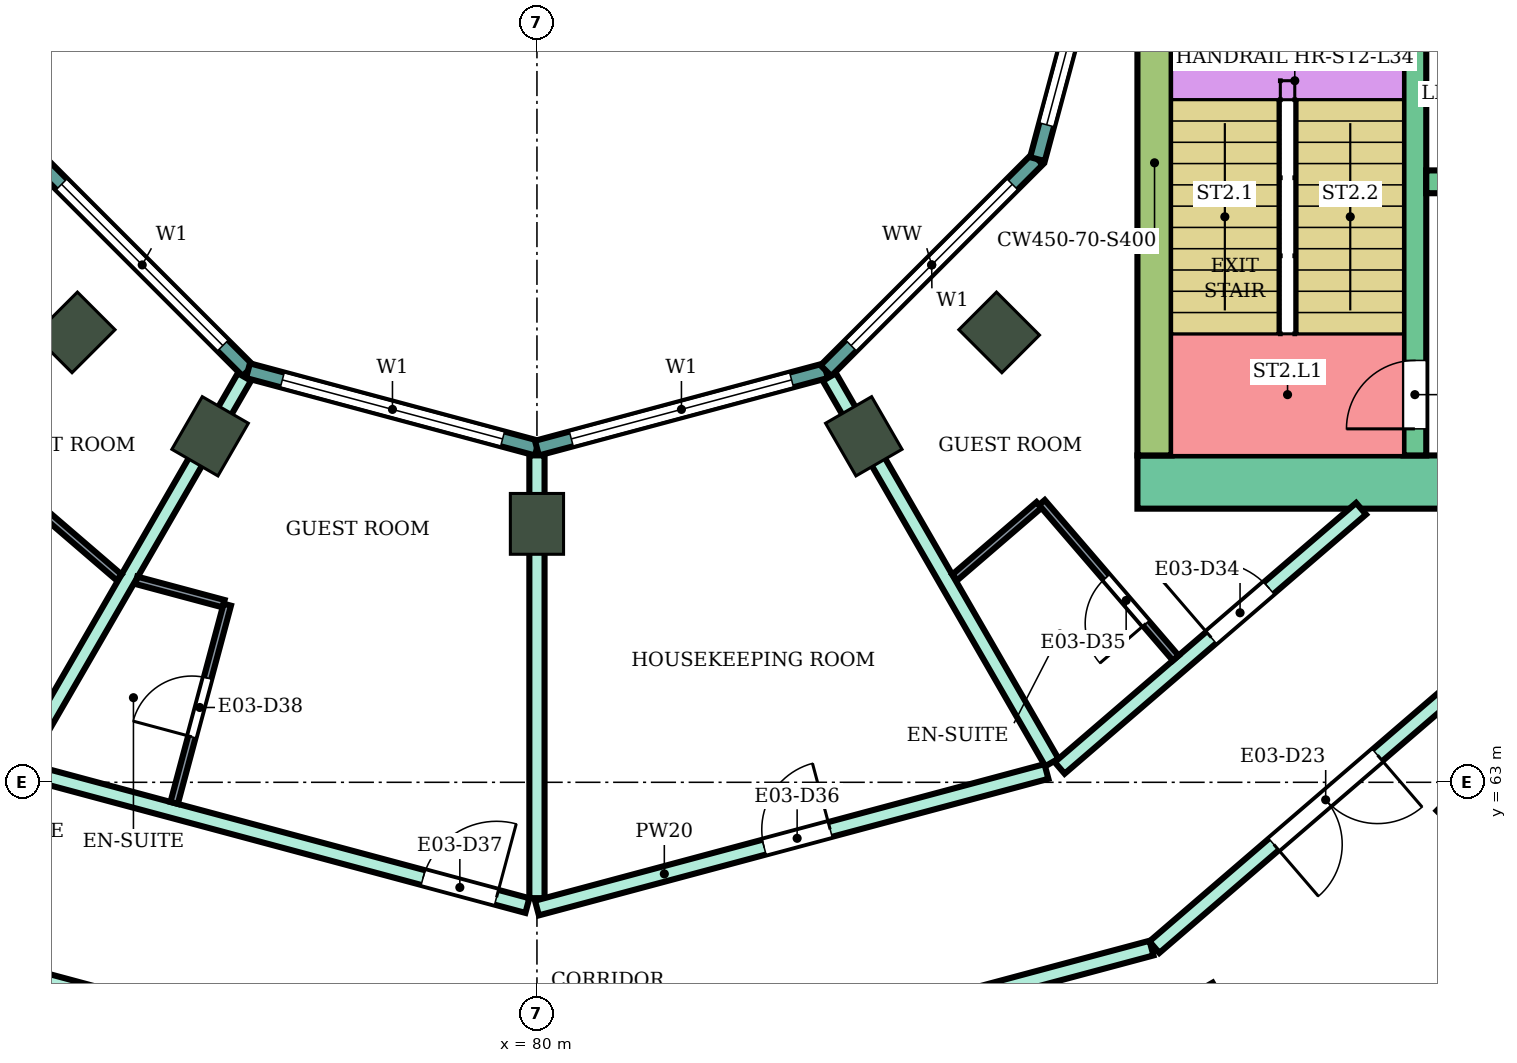
"""IFC4 building model, lengths in metres.
Left out: names, types, materials, properties, quantities, classifications, styles, units other than length and angle.
Written with IfcOpenShell. Run it as: python <this file> out.ifc"""

import sys

from ifc_helpers import new_model, si_unit, direction, frame, frame_2d, origin, origin_2d, place, context, subcontext, project, spatial, rectangle, extrude, element, fill, save


model = new_model("IFC4")
c1 = context("Model", 3, precision=1e-05, world=origin(), true_north=direction((0.0, 1.0)))
c2 = subcontext(c1, "Body", "Model", "MODEL_VIEW")
j1 = project(units=[si_unit("LENGTHUNIT", "METRE"), si_unit("PLANEANGLEUNIT", "RADIAN")], contexts=[c1])
p1 = place(None, origin())
s1 = spatial("IfcSite", under=j1, at=p1, CompositionType="ELEMENT")
p2 = place(p1, origin())
s2 = spatial("IfcBuilding", under=s1, at=p2, CompositionType="ELEMENT")
p3 = place(p2, frame((0.0, 0.0, 145.8)))
s3 = spatial("IfcBuildingStorey", under=s2, at=p3, CompositionType="ELEMENT", Elevation=145.8)
for number, where, z_axis, x_axis in (
    (1, (88.8, 59.758, 0.0), (0.0, 0.0, 1.0), (0.5, -0.866, 0.0)),
    (2, (92.445, 62.555, 0.0), (0.0, 0.0, 1.0), (0.707, -0.707, 0.0)),
):
    element("IfcColumn", number, at=place(p3, frame(where, z_axis=z_axis, x_axis=x_axis)), inside=s3, PredefinedType="COLUMN", context=c2, shape_type="SweptSolid", body=[
        extrude(rectangle(XDim=1.0, YDim=0.8, at=origin_2d()), origin(), (0.0, 0.0, 1.0), 3.9),
    ])
for number, where, z_axis, x_axis in (
    (3, (73.919, 68.919, 0.0), (0.0, 0.0, 1.0), (-0.707, -0.707, 0.0)),
    (4, (75.7, 67.552, 0.0), (0.0, 0.0, 1.0), (-0.5, -0.866, 0.0)),
    (5, (80.0, 66.4, 0.0), (0.0, 0.0, 1.0), (0.0, -1.0, 0.0)),
    (6, (84.3, 67.552, 0.0), (0.0, 0.0, 1.0), (0.5, -0.866, 0.0)),
    (7, (86.081, 68.919, 0.0), (0.0, 0.0, 1.0), (0.707, -0.707, 0.0)),
):
    element("IfcColumn", number, at=place(p3, frame(where, z_axis=z_axis, x_axis=x_axis)), inside=s3, PredefinedType="COLUMN", context=c2, shape_type="SweptSolid", body=[
        extrude(rectangle(XDim=0.8, YDim=0.7, at=origin_2d()), origin(), (0.0, 0.0, 1.0), 3.9),
    ])
p4 = place(p3, frame((87.9, 66.95, 0.0), z_axis=(0.0, 0.0, 1.0), x_axis=(1.0, 0.0, 0.0)))
e8 = element("IfcWall", 8, at=p4, inside=s3, PredefinedType="SHEAR", context=c2, shape_type="SweptSolid", body=[
    extrude(rectangle(XDim=14.8, YDim=0.7, at=frame_2d((7.4, 0.0))), origin(), (0.0, 0.0, 1.0), 3.5),
])
p5 = place(p4, frame((4.2, 0.0, 0.0)))
e9 = element("IfcOpeningElement", 9, at=p5, cuts=e8, PredefinedType="OPENING", context=c2, shape_type="SweptSolid", body=[
    extrude(rectangle(XDim=2.4, YDim=2.4, at=frame_2d((1.2, 1.2))), frame((0.0, 0.36, 0.0), z_axis=(0.0, -1.0, 0.0), x_axis=(1.0, 0.0, 0.0)), (0.0, 0.0, 1.0), 0.72),
])
p6 = place(p3, frame((88.125, 67.3, 0.0), z_axis=(0.0, 0.0, 1.0), x_axis=(0.0, 1.0, 0.0)))
e10 = element("IfcWall", 10, at=p6, inside=s3, PredefinedType="SHEAR", context=c2, shape_type="SweptSolid", body=[
    extrude(rectangle(XDim=7.7, YDim=0.45, at=frame_2d((3.85, 0.0))), origin(), (0.0, 0.0, 1.0), 3.5),
])
p7 = place(p3, frame((91.55, 67.3, 0.0), z_axis=(0.0, 0.0, 1.0), x_axis=(0.0, 1.0, 0.0)))
e11 = element("IfcWall", 11, at=p7, inside=s3, PredefinedType="SHEAR", context=c2, shape_type="SweptSolid", body=[
    extrude(rectangle(XDim=7.7, YDim=0.3, at=frame_2d((3.85, 0.0))), origin(), (0.0, 0.0, 1.0), 3.5),
])
p8 = place(p7, frame((0.35, 0.0, 0.0)))
e12 = element("IfcOpeningElement", 12, at=p8, cuts=e11, PredefinedType="OPENING", context=c2, shape_type="SweptSolid", body=[
    extrude(rectangle(XDim=0.9, YDim=2.1, at=frame_2d((0.45, 1.05))), frame((0.0, 0.16, 0.0), z_axis=(0.0, -1.0, 0.0), x_axis=(1.0, 0.0, 0.0)), (0.0, 0.0, 1.0), 0.32),
])
p9 = place(p3, frame((91.7, 70.9, 0.0), z_axis=(0.0, 0.0, 1.0), x_axis=(1.0, 0.0, 0.0)))
e13 = element("IfcWall", 13, at=p9, inside=s3, PredefinedType="SHEAR", context=c2, shape_type="SweptSolid", body=[
    extrude(rectangle(XDim=11.0, YDim=0.3, at=frame_2d((5.5, 0.0))), origin(), (0.0, 0.0, 1.0), 3.5),
])
p10 = place(p9, frame((0.4, 0.0, 0.0)))
e14 = element("IfcOpeningElement", 14, at=p10, cuts=e13, PredefinedType="OPENING", context=c2, shape_type="SweptSolid", body=[
    extrude(rectangle(XDim=1.4, YDim=2.1, at=frame_2d((0.7, 1.05))), frame((0.0, 0.16, 0.0), z_axis=(0.0, -1.0, 0.0), x_axis=(1.0, 0.0, 0.0)), (0.0, 0.0, 1.0), 0.32),
])
p11 = place(p9, frame((5.4, 0.0, 0.0)))
e15 = element("IfcOpeningElement", 15, at=p11, cuts=e13, PredefinedType="OPENING", context=c2, shape_type="SweptSolid", body=[
    extrude(rectangle(XDim=1.4, YDim=2.1, at=frame_2d((0.7, 1.05))), frame((0.0, 0.16, 0.0), z_axis=(0.0, -1.0, 0.0), x_axis=(1.0, 0.0, 0.0)), (0.0, 0.0, 1.0), 0.32),
])
p12 = place(p9, frame((8.1, 0.0, 0.0)))
e16 = element("IfcOpeningElement", 16, at=p12, cuts=e13, PredefinedType="OPENING", context=c2, shape_type="SweptSolid", body=[
    extrude(rectangle(XDim=1.0, YDim=2.1, at=frame_2d((0.5, 1.05))), frame((0.0, 0.16, 0.0), z_axis=(0.0, -1.0, 0.0), x_axis=(1.0, 0.0, 0.0)), (0.0, 0.0, 1.0), 0.32),
])
p13 = place(p3, frame((73.415, 71.198, 0.0), z_axis=(0.0, 0.0, 1.0), x_axis=(0.707106781187, -0.707106781187, 0.0)))
e17 = element("IfcWall", 17, at=p13, inside=s3, PredefinedType="NOTDEFINED", context=c2, shape_type="SweptSolid", body=[
    extrude(rectangle(XDim=3.936, YDim=0.2, at=frame_2d((1.968, 0.0))), origin(), (0.0, 0.0, 1.0), 3.9),
])
p14 = place(p13, frame((0.468, 0.0, 0.9)))
e18 = element("IfcOpeningElement", 18, at=p14, cuts=e17, PredefinedType="OPENING", context=c2, shape_type="SweptSolid", body=[
    extrude(rectangle(XDim=3.0, YDim=2.3, at=frame_2d((1.5, 1.15))), frame((0.0, 0.11, 0.0), z_axis=(0.0, -1.0, 0.0), x_axis=(1.0, 0.0, 0.0)), (0.0, 0.0, 1.0), 0.22),
])
p15 = place(p3, frame((76.198, 68.415, 0.0), z_axis=(0.0, 0.0, 1.0), x_axis=(0.965933654434, -0.258789828301, 0.0)))
e19 = element("IfcWall", 19, at=p15, inside=s3, PredefinedType="NOTDEFINED", context=c2, shape_type="SweptSolid", body=[
    extrude(rectangle(XDim=3.936, YDim=0.2, at=frame_2d((1.968, 0.0))), origin(), (0.0, 0.0, 1.0), 3.9),
])
p16 = place(p15, frame((0.468, 0.0, 0.9)))
e20 = element("IfcOpeningElement", 20, at=p16, cuts=e19, PredefinedType="OPENING", context=c2, shape_type="SweptSolid", body=[
    extrude(rectangle(XDim=3.0, YDim=2.3, at=frame_2d((1.5, 1.15))), frame((0.0, 0.11, 0.0), z_axis=(0.0, -1.0, 0.0), x_axis=(1.0, 0.0, 0.0)), (0.0, 0.0, 1.0), 0.22),
])
p17 = place(p3, frame((80.0, 67.396, 0.0), z_axis=(0.0, 0.0, 1.0), x_axis=(0.965933654434, 0.258789828301, 0.0)))
e21 = element("IfcWall", 21, at=p17, inside=s3, PredefinedType="NOTDEFINED", context=c2, shape_type="SweptSolid", body=[
    extrude(rectangle(XDim=3.936, YDim=0.2, at=frame_2d((1.968, 0.0))), origin(), (0.0, 0.0, 1.0), 3.9),
])
p18 = place(p17, frame((0.468, 0.0, 0.9)))
e22 = element("IfcOpeningElement", 22, at=p18, cuts=e21, PredefinedType="OPENING", context=c2, shape_type="SweptSolid", body=[
    extrude(rectangle(XDim=3.0, YDim=2.3, at=frame_2d((1.5, 1.15))), frame((0.0, 0.11, 0.0), z_axis=(0.0, -1.0, 0.0), x_axis=(1.0, 0.0, 0.0)), (0.0, 0.0, 1.0), 0.22),
])
p19 = place(p3, frame((83.802, 68.415, 0.0), z_axis=(0.0, 0.0, 1.0), x_axis=(0.707106781187, 0.707106781187, 0.0)))
e23 = element("IfcWall", 23, at=p19, inside=s3, PredefinedType="NOTDEFINED", context=c2, shape_type="SweptSolid", body=[
    extrude(rectangle(XDim=3.936, YDim=0.2, at=frame_2d((1.968, 0.0))), origin(), (0.0, 0.0, 1.0), 3.9),
])
p20 = place(p19, frame((0.468, 0.0, 0.9)))
e24 = element("IfcOpeningElement", 24, at=p20, cuts=e23, PredefinedType="OPENING", context=c2, shape_type="SweptSolid", body=[
    extrude(rectangle(XDim=3.0, YDim=2.3, at=frame_2d((1.5, 1.15))), frame((0.0, 0.11, 0.0), z_axis=(0.0, -1.0, 0.0), x_axis=(1.0, 0.0, 0.0)), (0.0, 0.0, 1.0), 0.22),
])
p21 = place(p3, frame((86.585, 71.198, 0.0), z_axis=(0.0, 0.0, 1.0), x_axis=(0.258789828301, 0.965933654434, 0.0)))
e25 = element("IfcWall", 25, at=p21, inside=s3, PredefinedType="NOTDEFINED", context=c2, shape_type="SweptSolid", body=[
    extrude(rectangle(XDim=3.936, YDim=0.2, at=frame_2d((1.968, 0.0))), origin(), (0.0, 0.0, 1.0), 3.9),
])
p22 = place(p21, frame((0.468, 0.0, 0.9)))
e26 = element("IfcOpeningElement", 26, at=p22, cuts=e25, PredefinedType="OPENING", context=c2, shape_type="SweptSolid", body=[
    extrude(rectangle(XDim=3.0, YDim=2.3, at=frame_2d((1.5, 1.15))), frame((0.0, 0.11, 0.0), z_axis=(0.0, -1.0, 0.0), x_axis=(1.0, 0.0, 0.0)), (0.0, 0.0, 1.0), 0.22),
])
p23 = place(p3, frame((71.877, 60.832, 0.0), z_axis=(0.0, 0.0, 1.0), x_axis=(0.965852509869, -0.259092510851, 0.0)))
e27 = element("IfcWall", 27, at=p23, inside=s3, PredefinedType="PARTITIONING", context=c2, shape_type="SweptSolid", body=[
    extrude(rectangle(XDim=8.32, YDim=0.2, at=frame_2d((4.16, 0.0))), origin(), (0.0, 0.0, 1.0), 3.45),
])
p24 = place(p23, frame((6.86, 0.0, 0.0)))
e28 = element("IfcOpeningElement", 28, at=p24, cuts=e27, PredefinedType="OPENING", context=c2, shape_type="SweptSolid", body=[
    extrude(rectangle(XDim=1.0, YDim=2.1, at=frame_2d((0.5, 1.05))), frame((0.0, 0.11, 0.0), z_axis=(0.0, -1.0, 0.0), x_axis=(1.0, 0.0, 0.0)), (0.0, 0.0, 1.0), 0.22),
])
p25 = place(p23, frame((0.55, 0.0, 0.0)))
e29 = element("IfcOpeningElement", 29, at=p25, cuts=e27, PredefinedType="OPENING", context=c2, shape_type="SweptSolid", body=[
    extrude(rectangle(XDim=1.0, YDim=2.1, at=frame_2d((0.5, 1.05))), frame((0.0, 0.11, 0.0), z_axis=(0.0, -1.0, 0.0), x_axis=(1.0, 0.0, 0.0)), (0.0, 0.0, 1.0), 0.22),
])
p26 = place(p3, frame((73.297, 63.143, 0.0), z_axis=(0.0, 0.0, 1.0), x_axis=(0.965859030528, -0.25906820173, 0.0)))
e30 = element("IfcWall", 30, at=p26, inside=s3, PredefinedType="PARTITIONING", context=c2, shape_type="SweptSolid", body=[
    extrude(rectangle(XDim=6.81, YDim=0.2, at=frame_2d((3.405, 0.0))), origin(), (0.0, 0.0, 1.0), 3.45),
])
p27 = place(p26, frame((5.39, 0.0, 0.0)))
e31 = element("IfcOpeningElement", 31, at=p27, cuts=e30, PredefinedType="OPENING", context=c2, shape_type="SweptSolid", body=[
    extrude(rectangle(XDim=1.0, YDim=2.1, at=frame_2d((0.5, 1.05))), frame((0.0, 0.11, 0.0), z_axis=(0.0, -1.0, 0.0), x_axis=(1.0, 0.0, 0.0)), (0.0, 0.0, 1.0), 0.22),
])
p28 = place(p3, frame((73.173, 63.176, 0.0), z_axis=(0.0, 0.0, 1.0), x_axis=(0.500239348149, 0.865887171959, 0.0)))
e32 = element("IfcWall", 32, at=p28, inside=s3, PredefinedType="PARTITIONING", context=c2, shape_type="SweptSolid", body=[
    extrude(rectangle(XDim=5.955, YDim=0.2, at=frame_2d((2.978, 0.0))), origin(), (0.0, 0.0, 1.0), 3.45),
])
p29 = place(p3, frame((80.0, 58.654, 0.0), z_axis=(0.0, 0.0, 1.0), x_axis=(0.965979808777, 0.25861749561, 0.0)))
e33 = element("IfcWall", 33, at=p29, inside=s3, PredefinedType="PARTITIONING", context=c2, shape_type="SweptSolid", body=[
    extrude(rectangle(XDim=8.37, YDim=0.2, at=frame_2d((4.185, 0.0))), origin(), (0.0, 0.0, 1.0), 3.45),
])
p30 = place(p29, frame((0.55, 0.0, 0.0)))
e34 = element("IfcOpeningElement", 34, at=p30, cuts=e33, PredefinedType="OPENING", context=c2, shape_type="SweptSolid", body=[
    extrude(rectangle(XDim=1.0, YDim=2.1, at=frame_2d((0.5, 1.05))), frame((0.0, 0.11, 0.0), z_axis=(0.0, -1.0, 0.0), x_axis=(1.0, 0.0, 0.0)), (0.0, 0.0, 1.0), 0.22),
])
p31 = place(p3, frame((80.0, 61.476, 0.0), z_axis=(0.0, 0.0, 1.0), x_axis=(0.0, 1.0, 0.0)))
e35 = element("IfcWall", 35, at=p31, inside=s3, PredefinedType="PARTITIONING", context=c2, shape_type="SweptSolid", body=[
    extrude(rectangle(XDim=5.825, YDim=0.2, at=frame_2d((2.913, 0.0))), origin(), (0.0, 0.0, 1.0), 3.45),
])
p32 = place(p3, frame((80.0, 61.346, 0.0), z_axis=(0.0, 0.0, 1.0), x_axis=(0.965915385935, 0.25885800589, 0.0)))
e36 = element("IfcWall", 36, at=p32, inside=s3, PredefinedType="PARTITIONING", context=c2, shape_type="SweptSolid", body=[
    extrude(rectangle(XDim=6.94, YDim=0.2, at=frame_2d((3.47, 0.0))), origin(), (0.0, 0.0, 1.0), 3.45),
])
p33 = place(p32, frame((3.094, 0.0, 0.0)))
e37 = element("IfcOpeningElement", 37, at=p33, cuts=e36, PredefinedType="OPENING", context=c2, shape_type="SweptSolid", body=[
    extrude(rectangle(XDim=0.9, YDim=2.1, at=frame_2d((0.45, 1.05))), frame((0.0, 0.11, 0.0), z_axis=(0.0, -1.0, 0.0), x_axis=(1.0, 0.0, 0.0)), (0.0, 0.0, 1.0), 0.22),
])
p34 = place(p3, frame((83.847, 68.332, 0.0), z_axis=(0.0, 0.0, 1.0), x_axis=(0.499901724708, -0.866082135617, 0.0)))
e38 = element("IfcWall", 38, at=p34, inside=s3, PredefinedType="PARTITIONING", context=c2, shape_type="SweptSolid", body=[
    extrude(rectangle(XDim=5.855, YDim=0.2, at=frame_2d((2.928, 0.0))), origin(), (0.0, 0.0, 1.0), 3.45),
])
p35 = place(p3, frame((86.877, 63.189, 0.0), z_axis=(0.0, 0.0, 1.0), x_axis=(0.758164888471, 0.652062881853, 0.0)))
e39 = element("IfcWall", 39, at=p35, inside=s3, PredefinedType="PARTITIONING", context=c2, shape_type="SweptSolid", body=[
    extrude(rectangle(XDim=5.23, YDim=0.2, at=frame_2d((2.615, 0.0))), origin(), (0.0, 0.0, 1.0), 3.45),
])
p36 = place(p35, frame((2.63, 0.0, 0.0)))
e40 = element("IfcOpeningElement", 40, at=p36, cuts=e39, PredefinedType="OPENING", context=c2, shape_type="SweptSolid", body=[
    extrude(rectangle(XDim=1.0, YDim=2.1, at=frame_2d((0.5, 1.05))), frame((0.0, 0.11, 0.0), z_axis=(0.0, -1.0, 0.0), x_axis=(1.0, 0.0, 0.0)), (0.0, 0.0, 1.0), 0.22),
])
p37 = place(p3, frame((88.123, 60.831, 0.0), z_axis=(0.0, 0.0, 1.0), x_axis=(0.758118199374, 0.652117164149, 0.0)))
e41 = element("IfcWall", 41, at=p37, inside=s3, PredefinedType="PARTITIONING", context=c2, shape_type="SweptSolid", body=[
    extrude(rectangle(XDim=6.486, YDim=0.2, at=frame_2d((3.243, 0.0))), origin(), (0.0, 0.0, 1.0), 3.45),
])
p38 = place(p37, frame((2.073, 0.0, 0.0)))
e42 = element("IfcOpeningElement", 42, at=p38, cuts=e41, PredefinedType="OPENING", context=c2, shape_type="SweptSolid", body=[
    extrude(rectangle(XDim=1.8, YDim=2.1, at=frame_2d((0.9, 1.05))), frame((0.0, 0.11, 0.0), z_axis=(0.0, -1.0, 0.0), x_axis=(1.0, 0.0, 0.0)), (0.0, 0.0, 1.0), 0.22),
])
p39 = place(p3, frame((73.357, 66.681, 0.0), z_axis=(0.0, 0.0, 1.0), x_axis=(0.758263469747, -0.651948242154, 0.0)))
e43 = element("IfcWall", 43, at=p39, inside=s3, PredefinedType="PARTITIONING", context=c2, shape_type="SweptSolid", body=[
    extrude(rectangle(XDim=1.511, YDim=0.1, at=frame_2d((0.755, 0.0))), origin(), (0.0, 0.0, 1.0), 3.45),
])
p40 = place(p3, frame((74.729, 65.657, 0.0), z_axis=(0.0, 0.0, 1.0), x_axis=(0.965948051503, -0.258736085224, 0.0)))
e44 = element("IfcWall", 44, at=p40, inside=s3, PredefinedType="PARTITIONING", context=c2, shape_type="SweptSolid", body=[
    extrude(rectangle(XDim=1.189, YDim=0.1, at=frame_2d((0.594, 0.0))), origin(), (0.0, 0.0, 1.0), 3.45),
])
p41 = place(p3, frame((75.227, 62.729, 0.0), z_axis=(0.0, 0.0, 1.0), x_axis=(0.258945475746, 0.965891940432, 0.0)))
e45 = element("IfcWall", 45, at=p41, inside=s3, PredefinedType="PARTITIONING", context=c2, shape_type="SweptSolid", body=[
    extrude(rectangle(XDim=2.7, YDim=0.1, at=frame_2d((1.35, 0.0))), origin(), (0.0, 0.0, 1.0), 3.45),
])
p42 = place(p41, frame((0.9, 0.0, 0.0)))
e46 = element("IfcOpeningElement", 46, at=p42, cuts=e45, PredefinedType="OPENING", context=c2, shape_type="SweptSolid", body=[
    extrude(rectangle(XDim=0.8, YDim=2.1, at=frame_2d((0.4, 1.05))), frame((0.0, 0.06, 0.0), z_axis=(0.0, -1.0, 0.0), x_axis=(1.0, 0.0, 0.0)), (0.0, 0.0, 1.0), 0.12),
])
p43 = place(p3, frame((85.497, 65.696, 0.0), z_axis=(0.0, 0.0, 1.0), x_axis=(0.75817032582, 0.652056559698, 0.0)))
e47 = element("IfcWall", 47, at=p43, inside=s3, PredefinedType="PARTITIONING", context=c2, shape_type="SweptSolid", body=[
    extrude(rectangle(XDim=1.461, YDim=0.1, at=frame_2d((0.73, 0.0))), origin(), (0.0, 0.0, 1.0), 3.45),
])
p44 = place(p3, frame((86.643, 66.681, 0.0), z_axis=(0.0, 0.0, 1.0), x_axis=(0.652264876065, -0.757991115682, 0.0)))
e48 = element("IfcWall", 48, at=p44, inside=s3, PredefinedType="PARTITIONING", context=c2, shape_type="SweptSolid", body=[
    extrude(rectangle(XDim=2.699, YDim=0.1, at=frame_2d((1.35, 0.0))), origin(), (0.0, 0.0, 1.0), 3.45),
])
p45 = place(p44, frame((1.3, 0.0, 0.0)))
e49 = element("IfcOpeningElement", 49, at=p45, cuts=e48, PredefinedType="OPENING", context=c2, shape_type="SweptSolid", body=[
    extrude(rectangle(XDim=0.8, YDim=2.1, at=frame_2d((0.4, 1.05))), frame((0.0, 0.06, 0.0), z_axis=(0.0, -1.0, 0.0), x_axis=(1.0, 0.0, 0.0)), (0.0, 0.0, 1.0), 0.12),
])
p46 = place(p14, origin())
e50 = element("IfcWindow", 50, at=p46, inside=s3, PartitioningType="SINGLE_PANEL", PredefinedType="WINDOW", context=c2, shape_type="SweptSolid", body=[
    extrude(rectangle(XDim=3.0, YDim=2.3, at=frame_2d((1.5, 1.15))), frame((0.0, 0.03, 0.0), z_axis=(0.0, -1.0, 0.0), x_axis=(1.0, 0.0, 0.0)), (0.0, 0.0, 1.0), 0.06),
])
fill(e18, e50)
p47 = place(p16, origin())
e51 = element("IfcWindow", 51, at=p47, inside=s3, PartitioningType="SINGLE_PANEL", PredefinedType="WINDOW", context=c2, shape_type="SweptSolid", body=[
    extrude(rectangle(XDim=3.0, YDim=2.3, at=frame_2d((1.5, 1.15))), frame((0.0, 0.03, 0.0), z_axis=(0.0, -1.0, 0.0), x_axis=(1.0, 0.0, 0.0)), (0.0, 0.0, 1.0), 0.06),
])
fill(e20, e51)
p48 = place(p18, origin())
e52 = element("IfcWindow", 52, at=p48, inside=s3, PartitioningType="SINGLE_PANEL", PredefinedType="WINDOW", context=c2, shape_type="SweptSolid", body=[
    extrude(rectangle(XDim=3.0, YDim=2.3, at=frame_2d((1.5, 1.15))), frame((0.0, 0.03, 0.0), z_axis=(0.0, -1.0, 0.0), x_axis=(1.0, 0.0, 0.0)), (0.0, 0.0, 1.0), 0.06),
])
fill(e22, e52)
p49 = place(p20, origin())
e53 = element("IfcWindow", 53, at=p49, inside=s3, PartitioningType="SINGLE_PANEL", PredefinedType="WINDOW", context=c2, shape_type="SweptSolid", body=[
    extrude(rectangle(XDim=3.0, YDim=2.3, at=frame_2d((1.5, 1.15))), frame((0.0, 0.03, 0.0), z_axis=(0.0, -1.0, 0.0), x_axis=(1.0, 0.0, 0.0)), (0.0, 0.0, 1.0), 0.06),
])
fill(e24, e53)
p50 = place(p22, origin())
e54 = element("IfcWindow", 54, at=p50, inside=s3, PartitioningType="SINGLE_PANEL", PredefinedType="WINDOW", context=c2, shape_type="SweptSolid", body=[
    extrude(rectangle(XDim=3.0, YDim=2.3, at=frame_2d((1.5, 1.15))), frame((0.0, 0.03, 0.0), z_axis=(0.0, -1.0, 0.0), x_axis=(1.0, 0.0, 0.0)), (0.0, 0.0, 1.0), 0.06),
])
fill(e26, e54)
p51 = place(p38, frame((1.8, 0.0, 0.0), z_axis=(0.0, 0.0, 1.0), x_axis=(-1.0, 0.0, 0.0)))
e55 = element("IfcDoor", 55, at=p51, inside=s3, OperationType="DOUBLE_DOOR_SINGLE_SWING", PredefinedType="DOOR", context=c2, shape_type="SweptSolid", body=[
    extrude(rectangle(XDim=1.8, YDim=2.1, at=frame_2d((0.9, 1.05))), frame((0.0, 0.025, 0.0), z_axis=(0.0, -1.0, 0.0), x_axis=(1.0, 0.0, 0.0)), (0.0, 0.0, 1.0), 0.05),
])
fill(e42, e55)
p52 = place(p36, origin())
e56 = element("IfcDoor", 56, at=p52, inside=s3, OperationType="SINGLE_SWING_LEFT", PredefinedType="DOOR", context=c2, shape_type="SweptSolid", body=[
    extrude(rectangle(XDim=1.0, YDim=2.1, at=frame_2d((0.5, 1.05))), frame((0.0, 0.025, 0.0), z_axis=(0.0, -1.0, 0.0), x_axis=(1.0, 0.0, 0.0)), (0.0, 0.0, 1.0), 0.05),
])
fill(e40, e56)
p53 = place(p45, frame((0.8, 0.0, 0.0), z_axis=(0.0, 0.0, 1.0), x_axis=(-1.0, 0.0, 0.0)))
e57 = element("IfcDoor", 57, at=p53, inside=s3, OperationType="SINGLE_SWING_LEFT", PredefinedType="DOOR", context=c2, shape_type="SweptSolid", body=[
    extrude(rectangle(XDim=0.8, YDim=2.1, at=frame_2d((0.4, 1.05))), frame((0.0, 0.025, 0.0), z_axis=(0.0, -1.0, 0.0), x_axis=(1.0, 0.0, 0.0)), (0.0, 0.0, 1.0), 0.05),
])
fill(e49, e57)
p54 = place(p33, origin())
e58 = element("IfcDoor", 58, at=p54, inside=s3, OperationType="SINGLE_SWING_RIGHT", PredefinedType="DOOR", context=c2, shape_type="SweptSolid", body=[
    extrude(rectangle(XDim=0.9, YDim=2.1, at=frame_2d((0.45, 1.05))), frame((0.0, 0.025, 0.0), z_axis=(0.0, -1.0, 0.0), x_axis=(1.0, 0.0, 0.0)), (0.0, 0.0, 1.0), 0.05),
])
fill(e37, e58)
p55 = place(p27, origin())
e59 = element("IfcDoor", 59, at=p55, inside=s3, OperationType="SINGLE_SWING_RIGHT", PredefinedType="DOOR", context=c2, shape_type="SweptSolid", body=[
    extrude(rectangle(XDim=1.0, YDim=2.1, at=frame_2d((0.5, 1.05))), frame((0.0, 0.025, 0.0), z_axis=(0.0, -1.0, 0.0), x_axis=(1.0, 0.0, 0.0)), (0.0, 0.0, 1.0), 0.05),
])
fill(e31, e59)
p56 = place(p42, origin())
e60 = element("IfcDoor", 60, at=p56, inside=s3, OperationType="SINGLE_SWING_LEFT", PredefinedType="DOOR", context=c2, shape_type="SweptSolid", body=[
    extrude(rectangle(XDim=0.8, YDim=2.1, at=frame_2d((0.4, 1.05))), frame((0.0, 0.025, 0.0), z_axis=(0.0, -1.0, 0.0), x_axis=(1.0, 0.0, 0.0)), (0.0, 0.0, 1.0), 0.05),
])
fill(e46, e60)
p57 = place(p8, origin())
e61 = element("IfcDoor", 61, at=p57, inside=s3, OperationType="SINGLE_SWING_LEFT", PredefinedType="DOOR", context=c2, shape_type="SweptSolid", body=[
    extrude(rectangle(XDim=0.9, YDim=2.1, at=frame_2d((0.45, 1.05))), frame((0.0, 0.025, 0.0), z_axis=(0.0, -1.0, 0.0), x_axis=(1.0, 0.0, 0.0)), (0.0, 0.0, 1.0), 0.05),
])
fill(e12, e61)
save(model, sys.argv[1])
